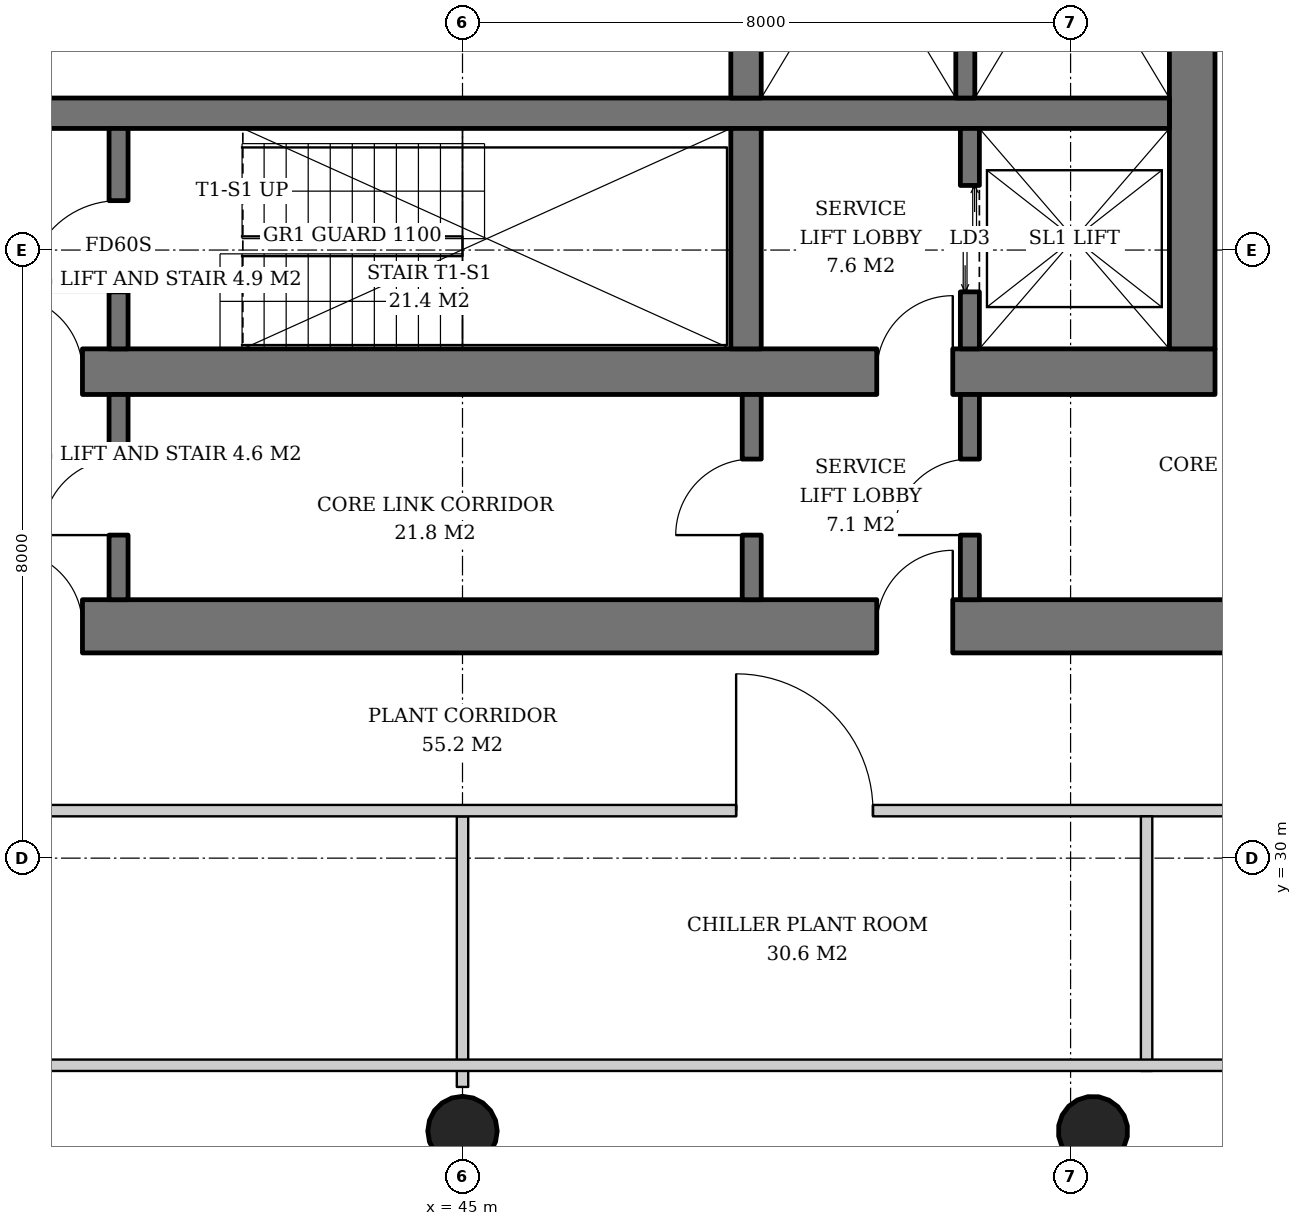
"""IFC4 building model, lengths in metres.
Left out: names, types, materials, properties, quantities, classifications, styles, units other than length and angle.
Written with IfcOpenShell. Run it as: python <this file> out.ifc"""

import sys

from ifc_helpers import new_model, si_unit, direction, frame, frame_2d, origin, origin_2d, place, context, subcontext, project, spatial, rectangle, hollow_circle, extrude, element, fill, save


model = new_model("IFC4")
c1 = context("Model", 3, precision=1e-05, world=origin(), true_north=direction((0.0, 1.0)))
c2 = subcontext(c1, "Body", "Model", "MODEL_VIEW")
j1 = project(units=[si_unit("LENGTHUNIT", "METRE"), si_unit("PLANEANGLEUNIT", "RADIAN")], contexts=[c1])
p1 = place(None, origin())
s1 = spatial("IfcSite", under=j1, at=p1, CompositionType="ELEMENT")
p2 = place(p1, origin())
s2 = spatial("IfcBuilding", under=s1, at=p2, CompositionType="ELEMENT")
p3 = place(p2, frame((0.0, 0.0, 157.8)))
s3 = spatial("IfcBuildingStorey", under=s2, at=p3, CompositionType="ELEMENT", Elevation=157.8)
p4 = place(p3, frame((45.0, 26.371, 0.0), z_axis=(0.0, 0.031978496719, 0.999488557087), x_axis=(-1.0, 0.0, 0.0)))
e1 = element("IfcColumn", 1, at=p4, inside=s3, PredefinedType="COLUMN", context=c2, shape_type="SweptSolid", body=[
    extrude(hollow_circle(Radius=0.457, WallThickness=0.03, at=origin_2d()), origin(), (0.0, 0.0, 1.0), 3.802),
])
p5 = place(p3, frame((53.314, 26.371, 0.0), z_axis=(-0.015923015547, 0.031974442509, 0.999361842679), x_axis=(-0.895145027055, -0.445775033553, 0.0)))
e2 = element("IfcColumn", 2, at=p5, inside=s3, PredefinedType="COLUMN", context=c2, shape_type="SweptSolid", body=[
    extrude(hollow_circle(Radius=0.457, WallThickness=0.03, at=origin_2d()), origin(), (0.0, 0.0, 1.0), 3.802),
])
p6 = place(p3, frame((35.1, 36.4, 0.0), z_axis=(0.0, 0.0, 1.0), x_axis=(1.0, 0.0, 0.0)))
e3 = element("IfcWall", 3, at=p6, inside=s3, PredefinedType="SHEAR", context=c2, shape_type="SweptSolid", body=[
    extrude(rectangle(XDim=19.8, YDim=0.6, at=frame_2d((9.9, 0.0))), origin(), (0.0, 0.0, 1.0), 3.8),
])
p7 = place(p6, frame((3.9, 0.0, 0.0)))
e4 = element("IfcOpeningElement", 4, at=p7, cuts=e3, PredefinedType="OPENING", context=c2, shape_type="SweptSolid", body=[
    extrude(rectangle(XDim=1.0, YDim=2.1, at=frame_2d((0.5, 1.05))), frame((0.0, 0.31, 0.0), z_axis=(0.0, -1.0, 0.0), x_axis=(1.0, 0.0, 0.0)), (0.0, 0.0, 1.0), 0.62),
])
p8 = place(p6, frame((15.35, 0.0, 0.0)))
e5 = element("IfcOpeningElement", 5, at=p8, cuts=e3, PredefinedType="OPENING", context=c2, shape_type="SweptSolid", body=[
    extrude(rectangle(XDim=1.0, YDim=2.1, at=frame_2d((0.5, 1.05))), frame((0.0, 0.31, 0.0), z_axis=(0.0, -1.0, 0.0), x_axis=(1.0, 0.0, 0.0)), (0.0, 0.0, 1.0), 0.62),
])
p9 = place(p3, frame((54.6, 36.7, 0.0), z_axis=(0.0, 0.0, 1.0), x_axis=(0.0, 1.0, 0.0)))
e6 = element("IfcWall", 6, at=p9, inside=s3, PredefinedType="SHEAR", context=c2, shape_type="SweptSolid", body=[
    extrude(rectangle(XDim=18.6, YDim=0.6, at=frame_2d((9.3, 0.0))), origin(), (0.0, 0.0, 1.0), 3.8),
])
p10 = place(p9, frame((8.4, 0.0, 0.0)))
e7 = element("IfcOpeningElement", 7, at=p10, cuts=e6, PredefinedType="OPENING", context=c2, shape_type="SweptSolid", body=[
    extrude(rectangle(XDim=1.8, YDim=2.4, at=frame_2d((0.9, 1.2))), frame((0.0, 0.31, 0.0), z_axis=(0.0, -1.0, 0.0), x_axis=(1.0, 0.0, 0.0)), (0.0, 0.0, 1.0), 0.62),
])
p11 = place(p3, frame((31.7, 33.05, 0.0), z_axis=(0.0, 0.0, 1.0), x_axis=(1.0, 0.0, 0.0)))
e8 = element("IfcWall", 8, at=p11, inside=s3, PredefinedType="SHEAR", context=c2, shape_type="SweptSolid", body=[
    extrude(rectangle(XDim=26.6, YDim=0.7, at=frame_2d((13.3, 0.0))), origin(), (0.0, 0.0, 1.0), 3.8),
])
p12 = place(p11, frame((7.3, 0.0, 0.0)))
e9 = element("IfcOpeningElement", 9, at=p12, cuts=e8, PredefinedType="OPENING", context=c2, shape_type="SweptSolid", body=[
    extrude(rectangle(XDim=1.0, YDim=2.1, at=frame_2d((0.5, 1.05))), frame((0.0, 0.36, 0.0), z_axis=(0.0, -1.0, 0.0), x_axis=(1.0, 0.0, 0.0)), (0.0, 0.0, 1.0), 0.72),
])
p13 = place(p11, frame((18.75, 0.0, 0.0)))
e10 = element("IfcOpeningElement", 10, at=p13, cuts=e8, PredefinedType="OPENING", context=c2, shape_type="SweptSolid", body=[
    extrude(rectangle(XDim=1.0, YDim=2.1, at=frame_2d((0.5, 1.05))), frame((0.0, 0.36, 0.0), z_axis=(0.0, -1.0, 0.0), x_axis=(1.0, 0.0, 0.0)), (0.0, 0.0, 1.0), 0.72),
])
p14 = place(p11, frame((1.85, 0.0, 0.0)))
e11 = element("IfcOpeningElement", 11, at=p14, cuts=e8, PredefinedType="OPENING", context=c2, shape_type="SweptSolid", body=[
    extrude(rectangle(XDim=1.0, YDim=2.1, at=frame_2d((0.5, 1.05))), frame((0.0, 0.36, 0.0), z_axis=(0.0, -1.0, 0.0), x_axis=(1.0, 0.0, 0.0)), (0.0, 0.0, 1.0), 0.72),
])
p15 = place(p11, frame((4.7, 0.0, 0.0)))
e12 = element("IfcOpeningElement", 12, at=p15, cuts=e8, PredefinedType="OPENING", context=c2, shape_type="SweptSolid", body=[
    extrude(rectangle(XDim=1.0, YDim=2.1, at=frame_2d((0.5, 1.05))), frame((0.0, 0.36, 0.0), z_axis=(0.0, -1.0, 0.0), x_axis=(1.0, 0.0, 0.0)), (0.0, 0.0, 1.0), 0.72),
])
p16 = place(p3, frame((35.7, 39.8, 0.0), z_axis=(0.0, 0.0, 1.0), x_axis=(1.0, 0.0, 0.0)))
e13 = element("IfcWall", 13, at=p16, inside=s3, PredefinedType="SHEAR", context=c2, shape_type="SweptSolid", body=[
    extrude(rectangle(XDim=18.6, YDim=0.4, at=frame_2d((9.3, 0.0))), origin(), (0.0, 0.0, 1.0), 3.8),
])
p17 = place(p3, frame((48.73, 36.7, 0.0), z_axis=(0.0, 0.0, 1.0), x_axis=(0.0, 1.0, 0.0)))
e14 = element("IfcWall", 14, at=p17, inside=s3, PredefinedType="SHEAR", context=c2, shape_type="SweptSolid", body=[
    extrude(rectangle(XDim=2.9, YDim=0.4, at=frame_2d((1.45, 0.0))), origin(), (0.0, 0.0, 1.0), 3.8),
])
p18 = place(p3, frame((48.73, 40.0, 0.0), z_axis=(0.0, 0.0, 1.0), x_axis=(0.0, 1.0, 0.0)))
e15 = element("IfcWall", 15, at=p18, inside=s3, PredefinedType="SHEAR", context=c2, shape_type="SweptSolid", body=[
    extrude(rectangle(XDim=12.0, YDim=0.4, at=frame_2d((6.0, 0.0))), origin(), (0.0, 0.0, 1.0), 3.8),
])
p19 = place(p18, frame((5.5, 0.0, 0.0)))
e16 = element("IfcOpeningElement", 16, at=p19, cuts=e15, PredefinedType="OPENING", context=c2, shape_type="SweptSolid", body=[
    extrude(rectangle(XDim=1.0, YDim=2.1, at=frame_2d((0.5, 1.05))), frame((0.0, 0.21, 0.0), z_axis=(0.0, -1.0, 0.0), x_axis=(1.0, 0.0, 0.0)), (0.0, 0.0, 1.0), 0.42),
])
p20 = place(p3, frame((40.475, 36.7, 0.0), z_axis=(0.0, 0.0, 1.0), x_axis=(0.0, 1.0, 0.0)))
e17 = element("IfcWall", 17, at=p20, inside=s3, PredefinedType="SHEAR", context=c2, shape_type="SweptSolid", body=[
    extrude(rectangle(XDim=2.9, YDim=0.25, at=frame_2d((1.45, 0.0))), origin(), (0.0, 0.0, 1.0), 3.8),
])
p21 = place(p20, frame((0.75, 0.0, 0.0)))
e18 = element("IfcOpeningElement", 18, at=p21, cuts=e17, PredefinedType="OPENING", context=c2, shape_type="SweptSolid", body=[
    extrude(rectangle(XDim=1.2, YDim=2.1, at=frame_2d((0.6, 1.05))), frame((0.0, 0.135, 0.0), z_axis=(0.0, -1.0, 0.0), x_axis=(1.0, 0.0, 0.0)), (0.0, 0.0, 1.0), 0.27),
])
p22 = place(p3, frame((51.675, 36.7, 0.0), z_axis=(0.0, 0.0, 1.0), x_axis=(0.0, 1.0, 0.0)))
e19 = element("IfcWall", 19, at=p22, inside=s3, PredefinedType="SHEAR", context=c2, shape_type="SweptSolid", body=[
    extrude(rectangle(XDim=2.9, YDim=0.25, at=frame_2d((1.45, 0.0))), origin(), (0.0, 0.0, 1.0), 3.8),
])
p23 = place(p22, frame((0.75, 0.0, 0.0)))
e20 = element("IfcOpeningElement", 20, at=p23, cuts=e19, PredefinedType="OPENING", context=c2, shape_type="SweptSolid", body=[
    extrude(rectangle(XDim=1.4, YDim=2.4, at=frame_2d((0.7, 1.2))), frame((0.0, 0.135, 0.0), z_axis=(0.0, -1.0, 0.0), x_axis=(1.0, 0.0, 0.0)), (0.0, 0.0, 1.0), 0.27),
])
p24 = place(p3, frame((51.615, 44.25, 0.0), z_axis=(0.0, 0.0, 1.0), x_axis=(0.0, -1.0, 0.0)))
e21 = element("IfcWall", 21, at=p24, inside=s3, PredefinedType="SHEAR", context=c2, shape_type="SweptSolid", body=[
    extrude(rectangle(XDim=4.25, YDim=0.25, at=frame_2d((2.125, 0.0))), origin(), (0.0, 0.0, 1.0), 3.8),
])
p25 = place(p3, frame((40.475, 33.4, 0.0), z_axis=(0.0, 0.0, 1.0), x_axis=(0.0, 1.0, 0.0)))
e22 = element("IfcWall", 22, at=p25, inside=s3, PredefinedType="SOLIDWALL", context=c2, shape_type="SweptSolid", body=[
    extrude(rectangle(XDim=2.7, YDim=0.25, at=frame_2d((1.35, 0.0))), origin(), (0.0, 0.0, 1.0), 3.52),
])
p26 = place(p25, frame((0.85, 0.0, 0.0)))
e23 = element("IfcOpeningElement", 23, at=p26, cuts=e22, PredefinedType="OPENING", context=c2, shape_type="SweptSolid", body=[
    extrude(rectangle(XDim=1.0, YDim=2.1, at=frame_2d((0.5, 1.05))), frame((0.0, 0.135, 0.0), z_axis=(0.0, -1.0, 0.0), x_axis=(1.0, 0.0, 0.0)), (0.0, 0.0, 1.0), 0.27),
])
p27 = place(p3, frame((48.805, 33.4, 0.0), z_axis=(0.0, 0.0, 1.0), x_axis=(0.0, 1.0, 0.0)))
e24 = element("IfcWall", 24, at=p27, inside=s3, PredefinedType="SOLIDWALL", context=c2, shape_type="SweptSolid", body=[
    extrude(rectangle(XDim=2.7, YDim=0.25, at=frame_2d((1.35, 0.0))), origin(), (0.0, 0.0, 1.0), 3.52),
])
p28 = place(p27, frame((0.85, 0.0, 0.0)))
e25 = element("IfcOpeningElement", 25, at=p28, cuts=e24, PredefinedType="OPENING", context=c2, shape_type="SweptSolid", body=[
    extrude(rectangle(XDim=1.0, YDim=2.1, at=frame_2d((0.5, 1.05))), frame((0.0, 0.135, 0.0), z_axis=(0.0, -1.0, 0.0), x_axis=(1.0, 0.0, 0.0)), (0.0, 0.0, 1.0), 0.27),
])
p29 = place(p3, frame((51.675, 33.4, 0.0), z_axis=(0.0, 0.0, 1.0), x_axis=(0.0, 1.0, 0.0)))
e26 = element("IfcWall", 26, at=p29, inside=s3, PredefinedType="SOLIDWALL", context=c2, shape_type="SweptSolid", body=[
    extrude(rectangle(XDim=2.7, YDim=0.25, at=frame_2d((1.35, 0.0))), origin(), (0.0, 0.0, 1.0), 3.52),
])
p30 = place(p29, frame((0.85, 0.0, 0.0)))
e27 = element("IfcOpeningElement", 27, at=p30, cuts=e26, PredefinedType="OPENING", context=c2, shape_type="SweptSolid", body=[
    extrude(rectangle(XDim=1.0, YDim=2.1, at=frame_2d((0.5, 1.05))), frame((0.0, 0.135, 0.0), z_axis=(0.0, -1.0, 0.0), x_axis=(1.0, 0.0, 0.0)), (0.0, 0.0, 1.0), 0.27),
])
p31 = place(p3, frame((45.0, 30.55, 0.0), z_axis=(0.0, 0.0, 1.0), x_axis=(0.0, -1.0, 0.0)))
e28 = element("IfcWall", 28, at=p31, inside=s3, PredefinedType="SOLIDWALL", context=c2, shape_type="SweptSolid", body=[
    extrude(rectangle(XDim=3.56, YDim=0.15, at=frame_2d((1.78, 0.0))), origin(), (0.0, 0.0, 1.0), 3.52),
])
p32 = place(p3, frame((31.431, 30.625, 0.0), z_axis=(0.0, 0.0, 1.0), x_axis=(1.0, 0.0, 0.0)))
e29 = element("IfcWall", 29, at=p32, inside=s3, PredefinedType="SOLIDWALL", context=c2, shape_type="SweptSolid", body=[
    extrude(rectangle(XDim=27.137, YDim=0.15, at=frame_2d((13.569, 0.0))), origin(), (0.0, 0.0, 1.0), 2.706),
])
p33 = place(p32, frame((6.131, 0.0, 0.0)))
e30 = element("IfcOpeningElement", 30, at=p33, cuts=e29, PredefinedType="OPENING", context=c2, shape_type="SweptSolid", body=[
    extrude(rectangle(XDim=1.8, YDim=2.4, at=frame_2d((0.9, 1.2))), frame((0.0, 0.085, 0.0), z_axis=(0.0, -1.0, 0.0), x_axis=(1.0, 0.0, 0.0)), (0.0, 0.0, 1.0), 0.17),
])
p34 = place(p32, frame((17.169, 0.0, 0.0)))
e31 = element("IfcOpeningElement", 31, at=p34, cuts=e29, PredefinedType="OPENING", context=c2, shape_type="SweptSolid", body=[
    extrude(rectangle(XDim=1.8, YDim=2.4, at=frame_2d((0.9, 1.2))), frame((0.0, 0.085, 0.0), z_axis=(0.0, -1.0, 0.0), x_axis=(1.0, 0.0, 0.0)), (0.0, 0.0, 1.0), 0.17),
])
p35 = place(p3, frame((54.0, 30.55, 0.0), z_axis=(0.0, 0.0, 1.0), x_axis=(0.0, -1.0, 0.0)))
e32 = element("IfcWall", 32, at=p35, inside=s3, PredefinedType="SOLIDWALL", context=c2, shape_type="SweptSolid", body=[
    extrude(rectangle(XDim=3.35, YDim=0.15, at=frame_2d((1.675, 0.0))), origin(), (0.0, 0.0, 1.0), 3.52),
])
p36 = place(p3, frame((60.8, 27.275, 0.0), z_axis=(0.0, 0.0, 1.0), x_axis=(-1.0, 0.0, 0.0)))
e33 = element("IfcWall", 33, at=p36, inside=s3, PredefinedType="PARTITIONING", context=c2, shape_type="SweptSolid", body=[
    extrude(rectangle(XDim=31.6, YDim=0.15, at=frame_2d((15.8, 0.0))), origin(), (0.0, 0.0, 1.0), 2.706),
])
p37 = place(p21, origin())
e34 = element("IfcDoor", 34, at=p37, inside=s3, OperationType="SINGLE_SWING_LEFT", PredefinedType="DOOR", context=c2, shape_type="SweptSolid", body=[
    extrude(rectangle(XDim=1.2, YDim=2.1, at=frame_2d((0.6, 1.05))), frame((0.0, 0.025, 0.0), z_axis=(0.0, -1.0, 0.0), x_axis=(1.0, 0.0, 0.0)), (0.0, 0.0, 1.0), 0.05),
])
fill(e18, e34)
p38 = place(p23, origin())
e35 = element("IfcDoor", 35, at=p38, inside=s3, OperationType="DOUBLE_DOOR_SLIDING", PredefinedType="DOOR", context=c2, shape_type="SweptSolid", body=[
    extrude(rectangle(XDim=1.4, YDim=2.4, at=frame_2d((0.7, 1.2))), frame((0.0, 0.025, 0.0), z_axis=(0.0, -1.0, 0.0), x_axis=(1.0, 0.0, 0.0)), (0.0, 0.0, 1.0), 0.05),
])
fill(e20, e35)
p39 = place(p26, origin())
e36 = element("IfcDoor", 36, at=p39, inside=s3, OperationType="SINGLE_SWING_LEFT", PredefinedType="DOOR", context=c2, shape_type="SweptSolid", body=[
    extrude(rectangle(XDim=1.0, YDim=2.1, at=frame_2d((0.5, 1.05))), frame((0.0, 0.025, 0.0), z_axis=(0.0, -1.0, 0.0), x_axis=(1.0, 0.0, 0.0)), (0.0, 0.0, 1.0), 0.05),
])
fill(e23, e36)
p40 = place(p28, origin())
e37 = element("IfcDoor", 37, at=p40, inside=s3, OperationType="SINGLE_SWING_LEFT", PredefinedType="DOOR", context=c2, shape_type="SweptSolid", body=[
    extrude(rectangle(XDim=1.0, YDim=2.1, at=frame_2d((0.5, 1.05))), frame((0.0, 0.025, 0.0), z_axis=(0.0, -1.0, 0.0), x_axis=(1.0, 0.0, 0.0)), (0.0, 0.0, 1.0), 0.05),
])
fill(e25, e37)
p41 = place(p30, origin())
e38 = element("IfcDoor", 38, at=p41, inside=s3, OperationType="SINGLE_SWING_LEFT", PredefinedType="DOOR", context=c2, shape_type="SweptSolid", body=[
    extrude(rectangle(XDim=1.0, YDim=2.1, at=frame_2d((0.5, 1.05))), frame((0.0, 0.025, 0.0), z_axis=(0.0, -1.0, 0.0), x_axis=(1.0, 0.0, 0.0)), (0.0, 0.0, 1.0), 0.05),
])
fill(e27, e38)
p42 = place(p7, origin())
e39 = element("IfcDoor", 39, at=p42, inside=s3, OperationType="SINGLE_SWING_LEFT", PredefinedType="DOOR", context=c2, shape_type="SweptSolid", body=[
    extrude(rectangle(XDim=1.0, YDim=2.1, at=frame_2d((0.5, 1.05))), frame((0.0, 0.025, 0.0), z_axis=(0.0, -1.0, 0.0), x_axis=(1.0, 0.0, 0.0)), (0.0, 0.0, 1.0), 0.05),
])
fill(e4, e39)
p43 = place(p8, origin())
e40 = element("IfcDoor", 40, at=p43, inside=s3, OperationType="SINGLE_SWING_RIGHT", PredefinedType="DOOR", context=c2, shape_type="SweptSolid", body=[
    extrude(rectangle(XDim=1.0, YDim=2.1, at=frame_2d((0.5, 1.05))), frame((0.0, 0.025, 0.0), z_axis=(0.0, -1.0, 0.0), x_axis=(1.0, 0.0, 0.0)), (0.0, 0.0, 1.0), 0.05),
])
fill(e5, e40)
p44 = place(p12, origin())
e41 = element("IfcDoor", 41, at=p44, inside=s3, OperationType="SINGLE_SWING_LEFT", PredefinedType="DOOR", context=c2, shape_type="SweptSolid", body=[
    extrude(rectangle(XDim=1.0, YDim=2.1, at=frame_2d((0.5, 1.05))), frame((0.0, 0.025, 0.0), z_axis=(0.0, -1.0, 0.0), x_axis=(1.0, 0.0, 0.0)), (0.0, 0.0, 1.0), 0.05),
])
fill(e9, e41)
p45 = place(p13, origin())
e42 = element("IfcDoor", 42, at=p45, inside=s3, OperationType="SINGLE_SWING_RIGHT", PredefinedType="DOOR", context=c2, shape_type="SweptSolid", body=[
    extrude(rectangle(XDim=1.0, YDim=2.1, at=frame_2d((0.5, 1.05))), frame((0.0, 0.025, 0.0), z_axis=(0.0, -1.0, 0.0), x_axis=(1.0, 0.0, 0.0)), (0.0, 0.0, 1.0), 0.05),
])
fill(e10, e42)
p46 = place(p34, origin())
e43 = element("IfcDoor", 43, at=p46, inside=s3, OperationType="DOUBLE_DOOR_SINGLE_SWING", PredefinedType="DOOR", context=c2, shape_type="SweptSolid", body=[
    extrude(rectangle(XDim=1.8, YDim=2.4, at=frame_2d((0.9, 1.2))), frame((0.0, 0.025, 0.0), z_axis=(0.0, -1.0, 0.0), x_axis=(1.0, 0.0, 0.0)), (0.0, 0.0, 1.0), 0.05),
])
fill(e31, e43)
save(model, sys.argv[1])
